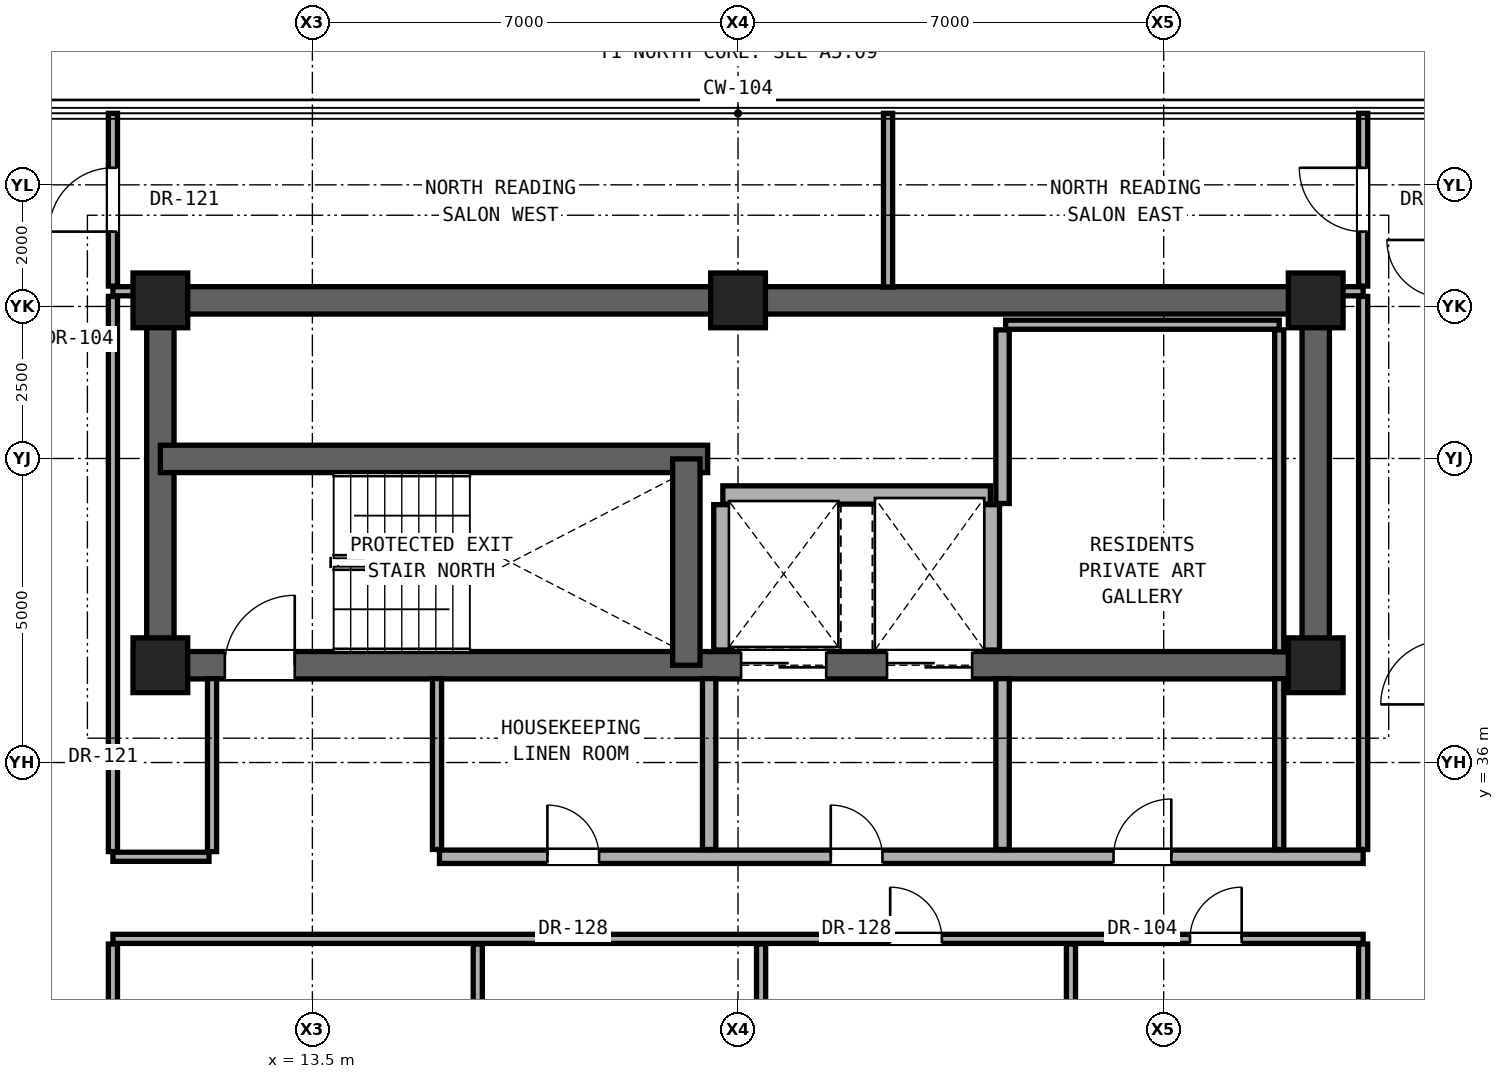
"""IFC4 building model, lengths in metres.
Left out: names, types, materials, properties, quantities, classifications, styles, units other than length and angle.
Written with IfcOpenShell. Run it as: python <this file> out.ifc"""

import sys

from ifc_helpers import new_model, si_unit, direction, frame, frame_2d, origin, origin_2d, place, context, subcontext, project, spatial, rectangle, extrude, element, fill, save


model = new_model("IFC4")
c1 = context("Model", 3, precision=1e-05, world=origin(), true_north=direction((0.0, 1.0)))
c2 = subcontext(c1, "Body", "Model", "MODEL_VIEW")
j1 = project(units=[si_unit("LENGTHUNIT", "METRE"), si_unit("PLANEANGLEUNIT", "RADIAN")], contexts=[c1])
p1 = place(None, origin())
s1 = spatial("IfcSite", under=j1, at=p1, CompositionType="ELEMENT")
p2 = place(p1, origin())
s2 = spatial("IfcBuilding", under=s1, at=p2, CompositionType="ELEMENT")
p3 = place(p2, frame((0.0, 0.0, 206.4)))
s3 = spatial("IfcBuildingStorey", under=s2, at=p3, CompositionType="ELEMENT", Elevation=206.4)
for number, where, z_axis, x_axis in (
    (1, (11.0, 37.6, 0.0), (0.0, 0.0, 1.0), (1.0, 0.0, 0.0)),
    (2, (30.0, 37.6, 0.0), (0.0, 0.0, 1.0), (1.0, 0.0, 0.0)),
    (3, (11.0, 43.6, 0.0), (0.0, 0.0, 1.0), (1.0, 0.0, 0.0)),
    (4, (20.5, 43.6, 0.0), (0.0, 0.0, 1.0), (1.0, 0.0, 0.0)),
    (5, (30.0, 43.6, 0.0), (0.0, 0.0, 1.0), (1.0, 0.0, 0.0)),
):
    element("IfcColumn", number, at=place(p3, frame(where, z_axis=z_axis, x_axis=x_axis)), inside=s3, PredefinedType="COLUMN", context=c2, shape_type="SweptSolid", body=[
        extrude(rectangle(XDim=0.9, YDim=0.9, at=origin_2d()), origin(), (0.0, 0.0, 1.0), 3.25),
    ])
p4 = place(p3, frame((11.0, 43.6, 0.0), z_axis=(0.0, 0.0, 1.0), x_axis=(1.0, 0.0, 0.0)))
e6 = element("IfcWall", 6, at=p4, inside=s3, PredefinedType="SHEAR", context=c2, shape_type="SweptSolid", body=[
    extrude(rectangle(XDim=19.0, YDim=0.45, at=frame_2d((9.5, 0.0))), origin(), (0.0, 0.0, 1.0), 3.05),
])
for number, where, z_axis, x_axis in (
    (7, (11.0, 37.6, 0.0), (0.0, 0.0, 1.0), (0.0, 1.0, 0.0)),
    (8, (30.0, 37.6, 0.0), (0.0, 0.0, 1.0), (0.0, 1.0, 0.0)),
):
    element("IfcWall", number, at=place(p3, frame(where, z_axis=z_axis, x_axis=x_axis)), inside=s3, PredefinedType="SHEAR", context=c2, shape_type="SweptSolid", body=[
        extrude(rectangle(XDim=6.0, YDim=0.45, at=frame_2d((3.0, 0.0))), origin(), (0.0, 0.0, 1.0), 3.05),
    ])
p5 = place(p3, frame((11.0, 37.6, 0.0), z_axis=(0.0, 0.0, 1.0), x_axis=(1.0, 0.0, 0.0)))
e9 = element("IfcWall", 9, at=p5, inside=s3, PredefinedType="SHEAR", context=c2, shape_type="SweptSolid", body=[
    extrude(rectangle(XDim=19.0, YDim=0.45, at=frame_2d((9.5, 0.0))), origin(), (0.0, 0.0, 1.0), 3.05),
])
p6 = place(p5, frame((1.06, 0.0, 0.0)))
e10 = element("IfcOpeningElement", 10, at=p6, cuts=e9, PredefinedType="OPENING", context=c2, shape_type="SweptSolid", body=[
    extrude(rectangle(XDim=1.15, YDim=2.2, at=frame_2d((0.575, 1.1))), frame((0.0, 0.235, 0.0), z_axis=(0.0, -1.0, 0.0), x_axis=(1.0, 0.0, 0.0)), (0.0, 0.0, 1.0), 0.47),
])
p7 = place(p5, frame((9.55, 0.0, 0.0)))
e11 = element("IfcOpeningElement", 11, at=p7, cuts=e9, PredefinedType="OPENING", context=c2, shape_type="SweptSolid", body=[
    extrude(rectangle(XDim=1.4, YDim=2.35, at=frame_2d((0.7, 1.175))), frame((0.0, 0.235, 0.0), z_axis=(0.0, -1.0, 0.0), x_axis=(1.0, 0.0, 0.0)), (0.0, 0.0, 1.0), 0.47),
])
p8 = place(p5, frame((11.95, 0.0, 0.0)))
e12 = element("IfcOpeningElement", 12, at=p8, cuts=e9, PredefinedType="OPENING", context=c2, shape_type="SweptSolid", body=[
    extrude(rectangle(XDim=1.4, YDim=2.35, at=frame_2d((0.7, 1.175))), frame((0.0, 0.235, 0.0), z_axis=(0.0, -1.0, 0.0), x_axis=(1.0, 0.0, 0.0)), (0.0, 0.0, 1.0), 0.47),
])
p9 = place(p3, frame((11.0, 40.993, 0.0), z_axis=(0.0, 0.0, 1.0), x_axis=(1.0, 0.0, 0.0)))
e13 = element("IfcWall", 13, at=p9, inside=s3, PredefinedType="SHEAR", context=c2, shape_type="SweptSolid", body=[
    extrude(rectangle(XDim=9.0, YDim=0.45, at=frame_2d((4.5, 0.0))), origin(), (0.0, 0.0, 1.0), 3.05),
])
p10 = place(p3, frame((19.65, 37.6, 0.0), z_axis=(0.0, 0.0, 1.0), x_axis=(0.0, 1.0, 0.0)))
e14 = element("IfcWall", 14, at=p10, inside=s3, PredefinedType="SHEAR", context=c2, shape_type="SweptSolid", body=[
    extrude(rectangle(XDim=3.393, YDim=0.45, at=frame_2d((1.696, 0.0))), origin(), (0.0, 0.0, 1.0), 3.05),
])
p11 = place(p3, frame((10.22, 33.1, 0.0), z_axis=(0.0, 0.0, 1.0), x_axis=(1.0, 0.0, 0.0)))
e15 = element("IfcWall", 15, at=p11, inside=s3, PredefinedType="PARTITIONING", context=c2, shape_type="SweptSolid", body=[
    extrude(rectangle(XDim=20.56, YDim=0.15, at=frame_2d((10.28, 0.0))), origin(), (0.0, 0.0, 1.0), 2.186),
])
p12 = place(p11, frame((12.782, 0.0, 0.0)))
e16 = element("IfcOpeningElement", 16, at=p12, cuts=e15, PredefinedType="OPENING", context=c2, shape_type="SweptSolid", body=[
    extrude(rectangle(XDim=0.85, YDim=2.01, at=frame_2d((0.425, 1.005))), frame((0.0, 0.085, 0.0), z_axis=(0.0, -1.0, 0.0), x_axis=(1.0, 0.0, 0.0)), (0.0, 0.0, 1.0), 0.17),
])
p13 = place(p11, frame((17.712, 0.0, 0.0)))
e17 = element("IfcOpeningElement", 17, at=p13, cuts=e15, PredefinedType="OPENING", context=c2, shape_type="SweptSolid", body=[
    extrude(rectangle(XDim=0.85, YDim=2.01, at=frame_2d((0.425, 1.005))), frame((0.0, 0.085, 0.0), z_axis=(0.0, -1.0, 0.0), x_axis=(1.0, 0.0, 0.0)), (0.0, 0.0, 1.0), 0.17),
])
p14 = place(p3, frame((10.22, 34.45, 0.0), z_axis=(0.0, 0.0, 1.0), x_axis=(1.0, 0.0, 0.0)))
e18 = element("IfcWall", 18, at=p14, inside=s3, PredefinedType="PARTITIONING", context=c2, shape_type="SweptSolid", body=[
    extrude(rectangle(XDim=1.58, YDim=0.15, at=frame_2d((0.79, 0.0))), origin(), (0.0, 0.0, 1.0), 2.186),
])
p15 = place(p3, frame((15.59, 34.45, 0.0), z_axis=(0.0, 0.0, 1.0), x_axis=(1.0, 0.0, 0.0)))
e19 = element("IfcWall", 19, at=p15, inside=s3, PredefinedType="SOLIDWALL", context=c2, shape_type="SweptSolid", body=[
    extrude(rectangle(XDim=15.19, YDim=0.22, at=frame_2d((7.595, 0.0))), origin(), (0.0, 0.0, 1.0), 2.186),
])
p16 = place(p15, frame((6.435, 0.0, 0.0)))
e20 = element("IfcOpeningElement", 20, at=p16, cuts=e19, PredefinedType="OPENING", context=c2, shape_type="SweptSolid", body=[
    extrude(rectangle(XDim=0.85, YDim=2.01, at=frame_2d((0.425, 1.005))), frame((0.0, 0.12, 0.0), z_axis=(0.0, -1.0, 0.0), x_axis=(1.0, 0.0, 0.0)), (0.0, 0.0, 1.0), 0.24),
])
p17 = place(p15, frame((11.085, 0.0, 0.0)))
e21 = element("IfcOpeningElement", 21, at=p17, cuts=e19, PredefinedType="OPENING", context=c2, shape_type="SweptSolid", body=[
    extrude(rectangle(XDim=0.95, YDim=2.15, at=frame_2d((0.475, 1.075))), frame((0.0, 0.12, 0.0), z_axis=(0.0, -1.0, 0.0), x_axis=(1.0, 0.0, 0.0)), (0.0, 0.0, 1.0), 0.24),
])
p18 = place(p15, frame((1.775, 0.0, 0.0)))
e22 = element("IfcOpeningElement", 22, at=p18, cuts=e19, PredefinedType="OPENING", context=c2, shape_type="SweptSolid", body=[
    extrude(rectangle(XDim=0.85, YDim=2.01, at=frame_2d((0.425, 1.005))), frame((0.0, 0.12, 0.0), z_axis=(0.0, -1.0, 0.0), x_axis=(1.0, 0.0, 0.0)), (0.0, 0.0, 1.0), 0.24),
])
p19 = place(p3, frame((20.25, 40.4, 0.0), z_axis=(0.0, 0.0, 1.0), x_axis=(1.0, 0.0, 0.0)))
e23 = element("IfcWall", 23, at=p19, inside=s3, PredefinedType="SOLIDWALL", context=c2, shape_type="SweptSolid", body=[
    extrude(rectangle(XDim=4.4, YDim=0.3, at=frame_2d((2.2, 0.0))), origin(), (0.0, 0.0, 1.0), 3.05),
])
p20 = place(p3, frame((24.9, 43.2, 0.0), z_axis=(0.0, 0.0, 1.0), x_axis=(1.0, 0.0, 0.0)))
e24 = element("IfcWall", 24, at=p20, inside=s3, PredefinedType="PARTITIONING", context=c2, shape_type="SweptSolid", body=[
    extrude(rectangle(XDim=4.5, YDim=0.15, at=frame_2d((2.25, 0.0))), origin(), (0.0, 0.0, 1.0), 3.05),
])
for number, where, z_axis, x_axis in (
    (25, (10.22, 43.75, 0.0), (0.0, 0.0, 1.0), (1.0, 0.0, 0.0)),
    (26, (30.22, 43.75, 0.0), (0.0, 0.0, 1.0), (1.0, 0.0, 0.0)),
):
    element("IfcWall", number, at=place(p3, frame(where, z_axis=z_axis, x_axis=x_axis)), inside=s3, PredefinedType="PARTITIONING", context=c2, shape_type="SweptSolid", body=[
        extrude(rectangle(XDim=0.56, YDim=0.15, at=frame_2d((0.28, 0.0))), origin(), (0.0, 0.0, 1.0), 3.05),
    ])
p21 = place(p3, frame((10.22, 22.935, 0.0), z_axis=(0.0, 0.0, 1.0), x_axis=(0.0, 1.0, 0.0)))
e27 = element("IfcWall", 27, at=p21, inside=s3, PredefinedType="PARTITIONING", context=c2, shape_type="SweptSolid", body=[
    extrude(rectangle(XDim=10.08, YDim=0.15, at=frame_2d((5.04, 0.0))), origin(), (0.0, 0.0, 1.0), 2.346),
])
p22 = place(p21, frame((4.565, 0.0, 0.0)))
e28 = element("IfcOpeningElement", 28, at=p22, cuts=e27, PredefinedType="OPENING", context=c2, shape_type="SweptSolid", body=[
    extrude(rectangle(XDim=0.95, YDim=2.15, at=frame_2d((0.475, 1.075))), frame((0.0, 0.085, 0.0), z_axis=(0.0, -1.0, 0.0), x_axis=(1.0, 0.0, 0.0)), (0.0, 0.0, 1.0), 0.17),
])
p23 = place(p3, frame((10.22, 34.535, 0.0), z_axis=(0.0, 0.0, 1.0), x_axis=(0.0, 1.0, 0.0)))
e29 = element("IfcWall", 29, at=p23, inside=s3, PredefinedType="PARTITIONING", context=c2, shape_type="SweptSolid", body=[
    extrude(rectangle(XDim=9.13, YDim=0.15, at=frame_2d((4.565, 0.0))), origin(), (0.0, 0.0, 1.0), 2.442),
])
p24 = place(p3, frame((10.22, 43.835, 0.0), z_axis=(0.0, 0.0, 1.0), x_axis=(0.0, 1.0, 0.0)))
e30 = element("IfcWall", 30, at=p24, inside=s3, PredefinedType="PARTITIONING", context=c2, shape_type="SweptSolid", body=[
    extrude(rectangle(XDim=2.841, YDim=0.15, at=frame_2d((1.42, 0.0))), origin(), (0.0, 0.0, 1.0), 3.05),
])
p25 = place(p24, frame((0.896, 0.0, 0.0)))
e31 = element("IfcOpeningElement", 31, at=p25, cuts=e30, PredefinedType="OPENING", context=c2, shape_type="SweptSolid", body=[
    extrude(rectangle(XDim=1.05, YDim=2.2, at=frame_2d((0.525, 1.1))), frame((0.0, 0.085, 0.0), z_axis=(0.0, -1.0, 0.0), x_axis=(1.0, 0.0, 0.0)), (0.0, 0.0, 1.0), 0.17),
])
p26 = place(p3, frame((11.85, 34.535, 0.0), z_axis=(0.0, 0.0, 1.0), x_axis=(0.0, 1.0, 0.0)))
e32 = element("IfcWall", 32, at=p26, inside=s3, PredefinedType="PARTITIONING", context=c2, shape_type="SweptSolid", body=[
    extrude(rectangle(XDim=2.845, YDim=0.15, at=frame_2d((1.422, 0.0))), origin(), (0.0, 0.0, 1.0), 3.05),
])
p27 = place(p3, frame((15.55, 34.57, 0.0), z_axis=(0.0, 0.0, 1.0), x_axis=(0.0, 1.0, 0.0)))
e33 = element("IfcWall", 33, at=p27, inside=s3, PredefinedType="PARTITIONING", context=c2, shape_type="SweptSolid", body=[
    extrude(rectangle(XDim=2.81, YDim=0.15, at=frame_2d((1.405, 0.0))), origin(), (0.0, 0.0, 1.0), 3.05),
])
p28 = place(p3, frame((16.22, 22.935, 0.0), z_axis=(0.0, 0.0, 1.0), x_axis=(0.0, 1.0, 0.0)))
e34 = element("IfcWall", 34, at=p28, inside=s3, PredefinedType="PARTITIONING", context=c2, shape_type="SweptSolid", body=[
    extrude(rectangle(XDim=10.08, YDim=0.15, at=frame_2d((5.04, 0.0))), origin(), (0.0, 0.0, 1.0), 2.186),
])
p29 = place(p3, frame((20.025, 34.57, 0.0), z_axis=(0.0, 0.0, 1.0), x_axis=(0.0, 1.0, 0.0)))
e35 = element("IfcWall", 35, at=p29, inside=s3, PredefinedType="SOLIDWALL", context=c2, shape_type="SweptSolid", body=[
    extrude(rectangle(XDim=2.81, YDim=0.22, at=frame_2d((1.405, 0.0))), origin(), (0.0, 0.0, 1.0), 3.05),
])
p30 = place(p3, frame((20.25, 37.85, 0.0), z_axis=(0.0, 0.0, 1.0), x_axis=(0.0, 1.0, 0.0)))
e36 = element("IfcWall", 36, at=p30, inside=s3, PredefinedType="SOLIDWALL", context=c2, shape_type="SweptSolid", body=[
    extrude(rectangle(XDim=2.39, YDim=0.3, at=frame_2d((1.195, 0.0))), origin(), (0.0, 0.0, 1.0), 3.05),
])
p31 = place(p3, frame((20.879, 19.985, 0.0), z_axis=(0.0, 0.0, 1.0), x_axis=(0.0, 1.0, 0.0)))
e37 = element("IfcWall", 37, at=p31, inside=s3, PredefinedType="PARTITIONING", context=c2, shape_type="SweptSolid", body=[
    extrude(rectangle(XDim=13.03, YDim=0.15, at=frame_2d((6.515, 0.0))), origin(), (0.0, 0.0, 1.0), 2.186),
])
p32 = place(p3, frame((22.967, 43.82, 0.0), z_axis=(0.0, 0.0, 1.0), x_axis=(0.0, 1.0, 0.0)))
e38 = element("IfcWall", 38, at=p32, inside=s3, PredefinedType="PARTITIONING", context=c2, shape_type="SweptSolid", body=[
    extrude(rectangle(XDim=2.856, YDim=0.15, at=frame_2d((1.428, 0.0))), origin(), (0.0, 0.0, 1.0), 3.05),
])
p33 = place(p3, frame((24.65, 37.85, 0.0), z_axis=(0.0, 0.0, 1.0), x_axis=(0.0, 1.0, 0.0)))
e39 = element("IfcWall", 39, at=p33, inside=s3, PredefinedType="SOLIDWALL", context=c2, shape_type="SweptSolid", body=[
    extrude(rectangle(XDim=2.39, YDim=0.3, at=frame_2d((1.195, 0.0))), origin(), (0.0, 0.0, 1.0), 3.05),
])
p34 = place(p3, frame((24.85, 34.57, 0.0), z_axis=(0.0, 0.0, 1.0), x_axis=(0.0, 1.0, 0.0)))
e40 = element("IfcWall", 40, at=p34, inside=s3, PredefinedType="SOLIDWALL", context=c2, shape_type="SweptSolid", body=[
    extrude(rectangle(XDim=2.81, YDim=0.22, at=frame_2d((1.405, 0.0))), origin(), (0.0, 0.0, 1.0), 3.05),
])
p35 = place(p3, frame((24.85, 40.26, 0.0), z_axis=(0.0, 0.0, 1.0), x_axis=(0.0, 1.0, 0.0)))
e41 = element("IfcWall", 41, at=p35, inside=s3, PredefinedType="SOLIDWALL", context=c2, shape_type="SweptSolid", body=[
    extrude(rectangle(XDim=2.855, YDim=0.22, at=frame_2d((1.427, 0.0))), origin(), (0.0, 0.0, 1.0), 3.05),
])
p36 = place(p3, frame((25.975, 19.985, 0.0), z_axis=(0.0, 0.0, 1.0), x_axis=(0.0, 1.0, 0.0)))
e42 = element("IfcWall", 42, at=p36, inside=s3, PredefinedType="PARTITIONING", context=c2, shape_type="SweptSolid", body=[
    extrude(rectangle(XDim=13.03, YDim=0.15, at=frame_2d((6.515, 0.0))), origin(), (0.0, 0.0, 1.0), 2.186),
])
p37 = place(p3, frame((29.4, 34.57, 0.0), z_axis=(0.0, 0.0, 1.0), x_axis=(0.0, 1.0, 0.0)))
e43 = element("IfcWall", 43, at=p37, inside=s3, PredefinedType="PARTITIONING", context=c2, shape_type="SweptSolid", body=[
    extrude(rectangle(XDim=2.81, YDim=0.15, at=frame_2d((1.405, 0.0))), origin(), (0.0, 0.0, 1.0), 3.05),
])
p38 = place(p3, frame((29.4, 37.82, 0.0), z_axis=(0.0, 0.0, 1.0), x_axis=(0.0, 1.0, 0.0)))
e44 = element("IfcWall", 44, at=p38, inside=s3, PredefinedType="PARTITIONING", context=c2, shape_type="SweptSolid", body=[
    extrude(rectangle(XDim=5.295, YDim=0.15, at=frame_2d((2.647, 0.0))), origin(), (0.0, 0.0, 1.0), 3.05),
])
p39 = place(p3, frame((30.78, 19.985, 0.0), z_axis=(0.0, 0.0, 1.0), x_axis=(0.0, 1.0, 0.0)))
e45 = element("IfcWall", 45, at=p39, inside=s3, PredefinedType="PARTITIONING", context=c2, shape_type="SweptSolid", body=[
    extrude(rectangle(XDim=13.03, YDim=0.15, at=frame_2d((6.515, 0.0))), origin(), (0.0, 0.0, 1.0), 2.346),
])
p40 = place(p3, frame((30.78, 34.57, 0.0), z_axis=(0.0, 0.0, 1.0), x_axis=(0.0, 1.0, 0.0)))
e46 = element("IfcWall", 46, at=p40, inside=s3, PredefinedType="PARTITIONING", context=c2, shape_type="SweptSolid", body=[
    extrude(rectangle(XDim=9.095, YDim=0.15, at=frame_2d((4.547, 0.0))), origin(), (0.0, 0.0, 1.0), 2.442),
])
p41 = place(p3, frame((30.78, 43.835, 0.0), z_axis=(0.0, 0.0, 1.0), x_axis=(0.0, 1.0, 0.0)))
e47 = element("IfcWall", 47, at=p41, inside=s3, PredefinedType="PARTITIONING", context=c2, shape_type="SweptSolid", body=[
    extrude(rectangle(XDim=2.841, YDim=0.15, at=frame_2d((1.42, 0.0))), origin(), (0.0, 0.0, 1.0), 3.05),
])
p42 = place(p41, frame((0.896, 0.0, 0.0)))
e48 = element("IfcOpeningElement", 48, at=p42, cuts=e47, PredefinedType="OPENING", context=c2, shape_type="SweptSolid", body=[
    extrude(rectangle(XDim=1.05, YDim=2.2, at=frame_2d((0.525, 1.1))), frame((0.0, 0.085, 0.0), z_axis=(0.0, -1.0, 0.0), x_axis=(1.0, 0.0, 0.0)), (0.0, 0.0, 1.0), 0.17),
])
p43 = place(p6, origin())
e49 = element("IfcDoor", 49, at=p43, inside=s3, OperationType="SINGLE_SWING_RIGHT", PredefinedType="DOOR", context=c2, shape_type="SweptSolid", body=[
    extrude(rectangle(XDim=1.15, YDim=2.2, at=frame_2d((0.575, 1.1))), frame((0.0, 0.025, 0.0), z_axis=(0.0, -1.0, 0.0), x_axis=(1.0, 0.0, 0.0)), (0.0, 0.0, 1.0), 0.05),
])
fill(e10, e49)
p44 = place(p16, origin())
e50 = element("IfcDoor", 50, at=p44, inside=s3, OperationType="SINGLE_SWING_LEFT", PredefinedType="DOOR", context=c2, shape_type="SweptSolid", body=[
    extrude(rectangle(XDim=0.85, YDim=2.01, at=frame_2d((0.425, 1.005))), frame((0.0, 0.025, 0.0), z_axis=(0.0, -1.0, 0.0), x_axis=(1.0, 0.0, 0.0)), (0.0, 0.0, 1.0), 0.05),
])
fill(e20, e50)
p45 = place(p17, origin())
e51 = element("IfcDoor", 51, at=p45, inside=s3, OperationType="SINGLE_SWING_RIGHT", PredefinedType="DOOR", context=c2, shape_type="SweptSolid", body=[
    extrude(rectangle(XDim=0.95, YDim=2.15, at=frame_2d((0.475, 1.075))), frame((0.0, 0.025, 0.0), z_axis=(0.0, -1.0, 0.0), x_axis=(1.0, 0.0, 0.0)), (0.0, 0.0, 1.0), 0.05),
])
fill(e21, e51)
p46 = place(p18, origin())
e52 = element("IfcDoor", 52, at=p46, inside=s3, OperationType="SINGLE_SWING_LEFT", PredefinedType="DOOR", context=c2, shape_type="SweptSolid", body=[
    extrude(rectangle(XDim=0.85, YDim=2.01, at=frame_2d((0.425, 1.005))), frame((0.0, 0.025, 0.0), z_axis=(0.0, -1.0, 0.0), x_axis=(1.0, 0.0, 0.0)), (0.0, 0.0, 1.0), 0.05),
])
fill(e22, e52)
p47 = place(p12, origin())
e53 = element("IfcDoor", 53, at=p47, inside=s3, OperationType="SINGLE_SWING_LEFT", PredefinedType="DOOR", context=c2, shape_type="SweptSolid", body=[
    extrude(rectangle(XDim=0.85, YDim=2.01, at=frame_2d((0.425, 1.005))), frame((0.0, 0.025, 0.0), z_axis=(0.0, -1.0, 0.0), x_axis=(1.0, 0.0, 0.0)), (0.0, 0.0, 1.0), 0.05),
])
fill(e16, e53)
p48 = place(p13, origin())
e54 = element("IfcDoor", 54, at=p48, inside=s3, OperationType="SINGLE_SWING_RIGHT", PredefinedType="DOOR", context=c2, shape_type="SweptSolid", body=[
    extrude(rectangle(XDim=0.85, YDim=2.01, at=frame_2d((0.425, 1.005))), frame((0.0, 0.025, 0.0), z_axis=(0.0, -1.0, 0.0), x_axis=(1.0, 0.0, 0.0)), (0.0, 0.0, 1.0), 0.05),
])
fill(e17, e54)
p49 = place(p25, origin())
e55 = element("IfcDoor", 55, at=p49, inside=s3, OperationType="SINGLE_SWING_LEFT", PredefinedType="DOOR", context=c2, shape_type="SweptSolid", body=[
    extrude(rectangle(XDim=1.05, YDim=2.2, at=frame_2d((0.525, 1.1))), frame((0.0, 0.025, 0.0), z_axis=(0.0, -1.0, 0.0), x_axis=(1.0, 0.0, 0.0)), (0.0, 0.0, 1.0), 0.05),
])
fill(e31, e55)
p50 = place(p42, origin())
e56 = element("IfcDoor", 56, at=p50, inside=s3, OperationType="SINGLE_SWING_RIGHT", PredefinedType="DOOR", context=c2, shape_type="SweptSolid", body=[
    extrude(rectangle(XDim=1.05, YDim=2.2, at=frame_2d((0.525, 1.1))), frame((0.0, 0.025, 0.0), z_axis=(0.0, -1.0, 0.0), x_axis=(1.0, 0.0, 0.0)), (0.0, 0.0, 1.0), 0.05),
])
fill(e48, e56)
p51 = place(p7, origin())
e57 = element("IfcDoor", 57, at=p51, inside=s3, OperationType="DOUBLE_DOOR_SLIDING", PredefinedType="DOOR", context=c2, shape_type="SweptSolid", body=[
    extrude(rectangle(XDim=1.4, YDim=2.35, at=frame_2d((0.7, 1.175))), frame((0.0, 0.025, 0.0), z_axis=(0.0, -1.0, 0.0), x_axis=(1.0, 0.0, 0.0)), (0.0, 0.0, 1.0), 0.05),
])
fill(e11, e57)
p52 = place(p8, origin())
e58 = element("IfcDoor", 58, at=p52, inside=s3, OperationType="DOUBLE_DOOR_SLIDING", PredefinedType="DOOR", context=c2, shape_type="SweptSolid", body=[
    extrude(rectangle(XDim=1.4, YDim=2.35, at=frame_2d((0.7, 1.175))), frame((0.0, 0.025, 0.0), z_axis=(0.0, -1.0, 0.0), x_axis=(1.0, 0.0, 0.0)), (0.0, 0.0, 1.0), 0.05),
])
fill(e12, e58)
save(model, sys.argv[1])
